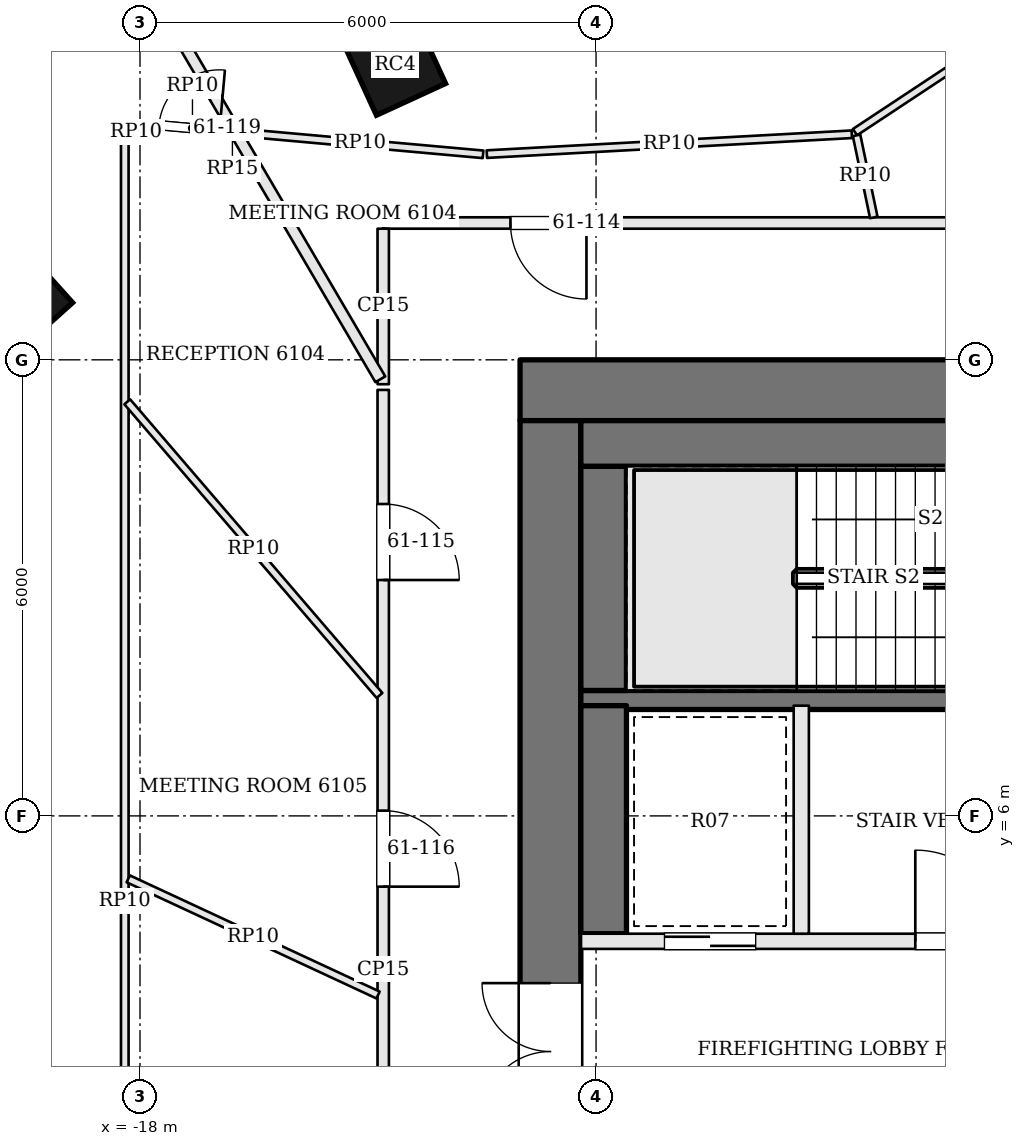
"""IFC4 building model, lengths in metres.
Left out: names, types, materials, properties, quantities, classifications, styles, units other than length and angle.
Written with IfcOpenShell. Run it as: python <this file> out.ifc"""

import sys

from ifc_helpers import new_model, si_unit, direction, frame, frame_2d, origin, origin_2d, place, context, subcontext, project, spatial, rectangle, extrude, element, fill, save


model = new_model("IFC4")
c1 = context("Model", 3, precision=1e-05, world=origin(), true_north=direction((0.0, 1.0)))
c2 = subcontext(c1, "Body", "Model", "MODEL_VIEW")
j1 = project(units=[si_unit("LENGTHUNIT", "METRE"), si_unit("PLANEANGLEUNIT", "RADIAN")], contexts=[c1])
p1 = place(None, origin())
s1 = spatial("IfcSite", under=j1, at=p1, CompositionType="ELEMENT")
p2 = place(p1, origin())
s2 = spatial("IfcBuilding", under=s1, at=p2, CompositionType="ELEMENT")
p3 = place(p2, frame((0.0, 0.0, 248.7)))
s3 = spatial("IfcBuildingStorey", under=s2, at=p3, CompositionType="ELEMENT", Elevation=248.7)
p4 = place(p3, frame((-13.0, 11.6, 0.0), z_axis=(0.0, 0.0, 1.0), x_axis=(1.0, 0.0, 0.0)))
e1 = element("IfcWall", 1, at=p4, inside=s3, PredefinedType="SHEAR", context=c2, shape_type="SweptSolid", body=[
    extrude(rectangle(XDim=26.0, YDim=0.8, at=frame_2d((13.0, 0.0))), origin(), (0.0, 0.0, 1.0), 3.9),
])
p5 = place(p4, frame((8.825, 0.0, 0.0)))
e2 = element("IfcOpeningElement", 2, at=p5, cuts=e1, PredefinedType="OPENING", context=c2, shape_type="SweptSolid", body=[
    extrude(rectangle(XDim=1.0, YDim=2.1, at=frame_2d((0.5, 1.05))), frame((0.0, 0.41, 0.0), z_axis=(0.0, -1.0, 0.0), x_axis=(1.0, 0.0, 0.0)), (0.0, 0.0, 1.0), 0.82),
])
p6 = place(p4, frame((11.825, 0.0, 0.0)))
e3 = element("IfcOpeningElement", 3, at=p6, cuts=e1, PredefinedType="OPENING", context=c2, shape_type="SweptSolid", body=[
    extrude(rectangle(XDim=0.7, YDim=2.1, at=frame_2d((0.35, 1.05))), frame((0.0, 0.41, 0.0), z_axis=(0.0, -1.0, 0.0), x_axis=(1.0, 0.0, 0.0)), (0.0, 0.0, 1.0), 0.82),
])
p7 = place(p4, frame((14.275, 0.0, 0.0)))
e4 = element("IfcOpeningElement", 4, at=p7, cuts=e1, PredefinedType="OPENING", context=c2, shape_type="SweptSolid", body=[
    extrude(rectangle(XDim=0.7, YDim=2.1, at=frame_2d((0.35, 1.05))), frame((0.0, 0.41, 0.0), z_axis=(0.0, -1.0, 0.0), x_axis=(1.0, 0.0, 0.0)), (0.0, 0.0, 1.0), 0.82),
])
p8 = place(p4, frame((16.175, 0.0, 0.0)))
e5 = element("IfcOpeningElement", 5, at=p8, cuts=e1, PredefinedType="OPENING", context=c2, shape_type="SweptSolid", body=[
    extrude(rectangle(XDim=1.0, YDim=2.1, at=frame_2d((0.5, 1.05))), frame((0.0, 0.41, 0.0), z_axis=(0.0, -1.0, 0.0), x_axis=(1.0, 0.0, 0.0)), (0.0, 0.0, 1.0), 0.82),
])
p9 = place(p3, frame((-12.6, -2.2, 0.0), z_axis=(0.0, 0.0, 1.0), x_axis=(0.0, 1.0, 0.0)))
e6 = element("IfcWall", 6, at=p9, inside=s3, PredefinedType="SHEAR", context=c2, shape_type="SweptSolid", body=[
    extrude(rectangle(XDim=13.4, YDim=0.8, at=frame_2d((6.7, 0.0))), origin(), (0.0, 0.0, 1.0), 3.9),
])
p10 = place(p9, frame((4.2, 0.0, 0.0)))
e7 = element("IfcOpeningElement", 7, at=p10, cuts=e6, PredefinedType="OPENING", context=c2, shape_type="SweptSolid", body=[
    extrude(rectangle(XDim=1.8, YDim=2.1, at=frame_2d((0.9, 1.05))), frame((0.0, 0.41, 0.0), z_axis=(0.0, -1.0, 0.0), x_axis=(1.0, 0.0, 0.0)), (0.0, 0.0, 1.0), 0.82),
])
for number, where, z_axis, x_axis in (
    (8, (-14.643, 15.881, 0.0), (0.0, 0.0, 1.0), (-0.909, -0.417, 0.0)),
    (9, (-19.593, 12.79, 0.0), (0.0, 0.0, 1.0), (-0.744, -0.668, 0.0)),
):
    element("IfcColumn", number, at=place(p3, frame(where, z_axis=z_axis, x_axis=x_axis)), inside=s3, PredefinedType="COLUMN", context=c2, shape_type="SweptSolid", body=[
        extrude(rectangle(XDim=1.0, YDim=1.0, at=origin_2d()), origin(), (0.0, 0.0, 1.0), 3.9),
    ])
p11 = place(p3, frame((-18.726, 18.663, 0.0), z_axis=(0.0, 0.0, 1.0), x_axis=(-0.83333921474, -0.552761931736, 0.0)))
e10 = element("IfcWall", 10, at=p11, inside=s3, PredefinedType="SOLIDWALL", context=c2, shape_type="SweptSolid", body=[
    extrude(rectangle(XDim=4.451, YDim=0.45, at=frame_2d((2.225, 0.0))), origin(), (0.0, 0.0, 1.0), 3.7),
])
p12 = place(p11, frame((1.175, 0.0, 0.9)))
e11 = element("IfcOpeningElement", 11, at=p12, cuts=e10, PredefinedType="OPENING", context=c2, shape_type="SweptSolid", body=[
    extrude(rectangle(XDim=2.1, YDim=2.3, at=frame_2d((1.05, 1.15))), frame((0.0, 0.235, 0.0), z_axis=(0.0, -1.0, 0.0), x_axis=(1.0, 0.0, 0.0)), (0.0, 0.0, 1.0), 0.47),
])
p13 = place(p3, frame((-12.2, 4.35, 0.0), z_axis=(0.0, 0.0, 1.0), x_axis=(1.0, 0.0, 0.0)))
e12 = element("IfcWall", 12, at=p13, inside=s3, PredefinedType="SOLIDWALL", context=c2, shape_type="SweptSolid", body=[
    extrude(rectangle(XDim=7.1, YDim=0.2, at=frame_2d((3.55, 0.0))), origin(), (0.0, 0.0, 1.0), 3.7),
])
p14 = place(p13, frame((4.4, 0.0, 0.0)))
e13 = element("IfcOpeningElement", 13, at=p14, cuts=e12, PredefinedType="OPENING", context=c2, shape_type="SweptSolid", body=[
    extrude(rectangle(XDim=1.2, YDim=2.1, at=frame_2d((0.6, 1.05))), frame((0.0, 0.11, 0.0), z_axis=(0.0, -1.0, 0.0), x_axis=(1.0, 0.0, 0.0)), (0.0, 0.0, 1.0), 0.22),
])
p15 = place(p13, frame((1.1, 0.0, 0.0)))
e14 = element("IfcOpeningElement", 14, at=p15, cuts=e12, PredefinedType="OPENING", context=c2, shape_type="SweptSolid", body=[
    extrude(rectangle(XDim=1.2, YDim=2.1, at=frame_2d((0.6, 1.05))), frame((0.0, 0.11, 0.0), z_axis=(0.0, -1.0, 0.0), x_axis=(1.0, 0.0, 0.0)), (0.0, 0.0, 1.0), 0.22),
])
p16 = place(p3, frame((-12.2, 7.525, 0.0), z_axis=(0.0, 0.0, 1.0), x_axis=(1.0, 0.0, 0.0)))
e15 = element("IfcWall", 15, at=p16, inside=s3, PredefinedType="SOLIDWALL", context=c2, shape_type="SweptSolid", body=[
    extrude(rectangle(XDim=7.1, YDim=0.25, at=frame_2d((3.55, 0.0))), origin(), (0.0, 0.0, 1.0), 3.7),
])
p17 = place(p16, frame((5.8, 0.0, 0.0)))
e16 = element("IfcOpeningElement", 16, at=p17, cuts=e15, PredefinedType="OPENING", context=c2, shape_type="SweptSolid", body=[
    extrude(rectangle(XDim=1.2, YDim=2.1, at=frame_2d((0.6, 1.05))), frame((0.0, 0.135, 0.0), z_axis=(0.0, -1.0, 0.0), x_axis=(1.0, 0.0, 0.0)), (0.0, 0.0, 1.0), 0.27),
])
p18 = place(p3, frame((-9.3, 4.45, 0.0), z_axis=(0.0, 0.0, 1.0), x_axis=(0.0, 1.0, 0.0)))
e17 = element("IfcWall", 17, at=p18, inside=s3, PredefinedType="SOLIDWALL", context=c2, shape_type="SweptSolid", body=[
    extrude(rectangle(XDim=3.0, YDim=0.2, at=frame_2d((1.5, 0.0))), origin(), (0.0, 0.0, 1.0), 3.7),
])
p19 = place(p3, frame((-11.9, 4.45, 0.0), z_axis=(0.0, 0.0, 1.0), x_axis=(0.0, 1.0, 0.0)))
e18 = element("IfcWall", 18, at=p19, inside=s3, PredefinedType="SOLIDWALL", context=c2, shape_type="SweptSolid", body=[
    extrude(rectangle(XDim=3.0, YDim=0.6, at=frame_2d((1.5, 0.0))), origin(), (0.0, 0.0, 1.0), 3.7),
])
p20 = place(p3, frame((-11.9, 7.65, 0.0), z_axis=(0.0, 0.0, 1.0), x_axis=(0.0, 1.0, 0.0)))
e19 = element("IfcWall", 19, at=p20, inside=s3, PredefinedType="SOLIDWALL", context=c2, shape_type="SweptSolid", body=[
    extrude(rectangle(XDim=2.95, YDim=0.6, at=frame_2d((1.475, 0.0))), origin(), (0.0, 0.0, 1.0), 3.7),
])
p21 = place(p3, frame((-12.2, 10.9, 0.0), z_axis=(0.0, 0.0, 1.0), x_axis=(1.0, 0.0, 0.0)))
e20 = element("IfcWall", 20, at=p21, inside=s3, PredefinedType="SOLIDWALL", context=c2, shape_type="SweptSolid", body=[
    extrude(rectangle(XDim=7.1, YDim=0.6, at=frame_2d((3.55, 0.0))), origin(), (0.0, 0.0, 1.0), 3.7),
])
p22 = place(p3, frame((5.458, 13.8, 0.0), z_axis=(0.0, 0.0, 1.0), x_axis=(-1.0, 0.0, 0.0)))
e21 = element("IfcWall", 21, at=p22, inside=s3, PredefinedType="PARTITIONING", context=c2, shape_type="SweptSolid", body=[
    extrude(rectangle(XDim=20.258, YDim=0.15, at=frame_2d((10.129, 0.0))), origin(), (0.0, 0.0, 1.0), 3.084),
])
p23 = place(p22, frame((5.957, 0.0, 0.0)))
e22 = element("IfcOpeningElement", 22, at=p23, cuts=e21, PredefinedType="OPENING", context=c2, shape_type="SweptSolid", body=[
    extrude(rectangle(XDim=1.8, YDim=2.1, at=frame_2d((0.9, 1.05))), frame((0.0, 0.085, 0.0), z_axis=(0.0, -1.0, 0.0), x_axis=(1.0, 0.0, 0.0)), (0.0, 0.0, 1.0), 0.17),
])
p24 = place(p22, frame((17.584, 0.0, 0.0)))
e23 = element("IfcOpeningElement", 23, at=p24, cuts=e21, PredefinedType="OPENING", context=c2, shape_type="SweptSolid", body=[
    extrude(rectangle(XDim=1.0, YDim=2.4, at=frame_2d((0.5, 1.2))), frame((0.0, 0.085, 0.0), z_axis=(0.0, -1.0, 0.0), x_axis=(1.0, 0.0, 0.0)), (0.0, 0.0, 1.0), 0.17),
])
p25 = place(p3, frame((-14.8, 13.725, 0.0), z_axis=(0.0, 0.0, 1.0), x_axis=(0.0, -1.0, 0.0)))
e24 = element("IfcWall", 24, at=p25, inside=s3, PredefinedType="PARTITIONING", context=c2, shape_type="SweptSolid", body=[
    extrude(rectangle(XDim=2.046, YDim=0.15, at=frame_2d((1.023, 0.0))), origin(), (0.0, 0.0, 1.0), 3.084),
])
p26 = place(p3, frame((-18.73, 18.384, 0.0), z_axis=(0.0, 0.0, 1.0), x_axis=(0.505731710935, -0.862690811679, 0.0)))
e25 = element("IfcWall", 25, at=p26, inside=s3, PredefinedType="PARTITIONING", context=c2, shape_type="SweptSolid", body=[
    extrude(rectangle(XDim=7.697, YDim=0.15, at=frame_2d((3.848, 0.0))), origin(), (0.0, 0.0, 1.0), 3.084),
])
p27 = place(p3, frame((-14.8, 11.604, 0.0), z_axis=(0.0, 0.0, 1.0), x_axis=(0.0, -1.0, 0.0)))
e26 = element("IfcWall", 26, at=p27, inside=s3, PredefinedType="PARTITIONING", context=c2, shape_type="SweptSolid", body=[
    extrude(rectangle(XDim=15.25, YDim=0.15, at=frame_2d((7.625, 0.0))), origin(), (0.0, 0.0, 1.0), 3.084),
])
p28 = place(p27, frame((1.501, 0.0, 0.0)))
e27 = element("IfcOpeningElement", 27, at=p28, cuts=e26, PredefinedType="OPENING", context=c2, shape_type="SweptSolid", body=[
    extrude(rectangle(XDim=1.0, YDim=2.1, at=frame_2d((0.5, 1.05))), frame((0.0, 0.085, 0.0), z_axis=(0.0, -1.0, 0.0), x_axis=(1.0, 0.0, 0.0)), (0.0, 0.0, 1.0), 0.17),
])
p29 = place(p27, frame((5.535, 0.0, 0.0)))
e28 = element("IfcOpeningElement", 28, at=p29, cuts=e26, PredefinedType="OPENING", context=c2, shape_type="SweptSolid", body=[
    extrude(rectangle(XDim=1.0, YDim=2.4, at=frame_2d((0.5, 1.2))), frame((0.0, 0.085, 0.0), z_axis=(0.0, -1.0, 0.0), x_axis=(1.0, 0.0, 0.0)), (0.0, 0.0, 1.0), 0.17),
])
p30 = place(p27, frame((9.35, 0.0, 0.0)))
e29 = element("IfcOpeningElement", 29, at=p30, cuts=e26, PredefinedType="OPENING", context=c2, shape_type="SweptSolid", body=[
    extrude(rectangle(XDim=1.0, YDim=2.1, at=frame_2d((0.5, 1.05))), frame((0.0, 0.085, 0.0), z_axis=(0.0, -1.0, 0.0), x_axis=(1.0, 0.0, 0.0)), (0.0, 0.0, 1.0), 0.17),
])
p31 = place(p27, frame((12.85, 0.0, 0.0)))
e30 = element("IfcOpeningElement", 30, at=p31, cuts=e26, PredefinedType="OPENING", context=c2, shape_type="SweptSolid", body=[
    extrude(rectangle(XDim=1.0, YDim=2.1, at=frame_2d((0.5, 1.05))), frame((0.0, 0.085, 0.0), z_axis=(0.0, -1.0, 0.0), x_axis=(1.0, 0.0, 0.0)), (0.0, 0.0, 1.0), 0.17),
])
p32 = place(p3, frame((-16.72, 14.994, 0.0), z_axis=(0.0, 0.0, 1.0), x_axis=(0.9959948888, -0.089410186696, 0.0)))
e31 = element("IfcWall", 31, at=p32, inside=s3, PredefinedType="PARTITIONING", context=c2, shape_type="SweptSolid", body=[
    extrude(rectangle(XDim=3.247, YDim=0.1, at=frame_2d((1.623, 0.0))), origin(), (0.0, 0.0, 1.0), 3.084),
])
p33 = place(p3, frame((-13.437, 14.706, 0.0), z_axis=(0.0, 0.0, 1.0), x_axis=(0.998525882111, 0.054277645072, 0.0)))
e32 = element("IfcWall", 32, at=p33, inside=s3, PredefinedType="PARTITIONING", context=c2, shape_type="SweptSolid", body=[
    extrude(rectangle(XDim=4.808, YDim=0.1, at=frame_2d((2.404, 0.0))), origin(), (0.0, 0.0, 1.0), 3.084),
])
p34 = place(p3, frame((-8.594, 14.995, 0.0), z_axis=(0.0, 0.0, 1.0), x_axis=(0.834065304192, 0.551665721559, 0.0)))
e33 = element("IfcWall", 33, at=p34, inside=s3, PredefinedType="PARTITIONING", context=c2, shape_type="SweptSolid", body=[
    extrude(rectangle(XDim=3.997, YDim=0.1, at=frame_2d((1.998, 0.0))), origin(), (0.0, 0.0, 1.0), 3.084),
])
p35 = place(p3, frame((-8.346, 13.873, 0.0), z_axis=(0.0, 0.0, 1.0), x_axis=(-0.205341331552, 0.978690419671, 0.0)))
e34 = element("IfcWall", 34, at=p35, inside=s3, PredefinedType="PARTITIONING", context=c2, shape_type="SweptSolid", body=[
    extrude(rectangle(XDim=1.103, YDim=0.1, at=frame_2d((0.552, 0.0))), origin(), (0.0, 0.0, 1.0), 3.084),
])
p36 = place(p3, frame((-18.2, 14.901, 0.0), z_axis=(0.0, 0.0, 1.0), x_axis=(0.833509335289, 0.552505373717, 0.0)))
e35 = element("IfcWall", 35, at=p36, inside=s3, PredefinedType="PARTITIONING", context=c2, shape_type="SweptSolid", body=[
    extrude(rectangle(XDim=0.36, YDim=0.1, at=frame_2d((0.18, 0.0))), origin(), (0.0, 0.0, 1.0), 3.084),
])
p37 = place(p3, frame((-17.85, 15.096, 0.0), z_axis=(0.0, 0.0, 1.0), x_axis=(0.995966605389, -0.089724695315, 0.0)))
e36 = element("IfcWall", 36, at=p37, inside=s3, PredefinedType="PARTITIONING", context=c2, shape_type="SweptSolid", body=[
    extrude(rectangle(XDim=1.086, YDim=0.1, at=frame_2d((0.543, 0.0))), origin(), (0.0, 0.0, 1.0), 3.084),
])
p38 = place(p37, frame((0.1, 0.0, 0.0)))
e37 = element("IfcOpeningElement", 37, at=p38, cuts=e36, PredefinedType="OPENING", context=c2, shape_type="SweptSolid", body=[
    extrude(rectangle(XDim=0.8, YDim=2.1, at=frame_2d((0.4, 1.05))), frame((0.0, 0.06, 0.0), z_axis=(0.0, -1.0, 0.0), x_axis=(1.0, 0.0, 0.0)), (0.0, 0.0, 1.0), 0.12),
])
p39 = place(p3, frame((-18.2, -5.081, 0.0), z_axis=(0.0, 0.0, 1.0), x_axis=(0.0, 1.0, 0.0)))
e38 = element("IfcWall", 38, at=p39, inside=s3, PredefinedType="PARTITIONING", context=c2, shape_type="SweptSolid", body=[
    extrude(rectangle(XDim=19.932, YDim=0.1, at=frame_2d((9.966, 0.0))), origin(), (0.0, 0.0, 1.0), 3.084),
])
p40 = place(p39, frame((6.707, 0.0, 0.0)))
e39 = element("IfcOpeningElement", 39, at=p40, cuts=e38, PredefinedType="OPENING", context=c2, shape_type="SweptSolid", body=[
    extrude(rectangle(XDim=0.9, YDim=2.1, at=frame_2d((0.45, 1.05))), frame((0.0, 0.06, 0.0), z_axis=(0.0, -1.0, 0.0), x_axis=(1.0, 0.0, 0.0)), (0.0, 0.0, 1.0), 0.12),
])
p41 = place(p39, frame((1.863, 0.0, 0.0)))
e40 = element("IfcOpeningElement", 40, at=p41, cuts=e38, PredefinedType="OPENING", context=c2, shape_type="SweptSolid", body=[
    extrude(rectangle(XDim=0.9, YDim=2.1, at=frame_2d((0.45, 1.05))), frame((0.0, 0.06, 0.0), z_axis=(0.0, -1.0, 0.0), x_axis=(1.0, 0.0, 0.0)), (0.0, 0.0, 1.0), 0.12),
])
p42 = place(p3, frame((-14.849, 7.584, 0.0), z_axis=(0.0, 0.0, 1.0), x_axis=(-0.65160818205, 0.758555717852, 0.0)))
e41 = element("IfcWall", 41, at=p42, inside=s3, PredefinedType="PARTITIONING", context=c2, shape_type="SweptSolid", body=[
    extrude(rectangle(XDim=5.093, YDim=0.1, at=frame_2d((2.546, 0.0))), origin(), (0.0, 0.0, 1.0), 3.084),
])
p43 = place(p3, frame((-14.868, 3.644, 0.0), z_axis=(0.0, 0.0, 1.0), x_axis=(-0.906769022566, 0.421627726455, 0.0)))
e42 = element("IfcWall", 42, at=p43, inside=s3, PredefinedType="PARTITIONING", context=c2, shape_type="SweptSolid", body=[
    extrude(rectangle(XDim=3.625, YDim=0.1, at=frame_2d((1.812, 0.0))), origin(), (0.0, 0.0, 1.0), 3.084),
])
p44 = place(p10, origin())
e43 = element("IfcDoor", 43, at=p44, inside=s3, OperationType="DOUBLE_DOOR_SINGLE_SWING", PredefinedType="DOOR", context=c2, shape_type="SweptSolid", body=[
    extrude(rectangle(XDim=1.8, YDim=2.1, at=frame_2d((0.9, 1.05))), frame((0.0, 0.025, 0.0), z_axis=(0.0, -1.0, 0.0), x_axis=(1.0, 0.0, 0.0)), (0.0, 0.0, 1.0), 0.05),
])
fill(e7, e43)
p45 = place(p14, origin())
e44 = element("IfcDoor", 44, at=p45, inside=s3, OperationType="SINGLE_SWING_LEFT", PredefinedType="DOOR", context=c2, shape_type="SweptSolid", body=[
    extrude(rectangle(XDim=1.2, YDim=2.1, at=frame_2d((0.6, 1.05))), frame((0.0, 0.025, 0.0), z_axis=(0.0, -1.0, 0.0), x_axis=(1.0, 0.0, 0.0)), (0.0, 0.0, 1.0), 0.05),
])
fill(e13, e44)
p46 = place(p15, origin())
e45 = element("IfcDoor", 45, at=p46, inside=s3, OperationType="SLIDING_TO_RIGHT", PredefinedType="DOOR", context=c2, shape_type="SweptSolid", body=[
    extrude(rectangle(XDim=1.2, YDim=2.1, at=frame_2d((0.6, 1.05))), frame((0.0, 0.025, 0.0), z_axis=(0.0, -1.0, 0.0), x_axis=(1.0, 0.0, 0.0)), (0.0, 0.0, 1.0), 0.05),
])
fill(e14, e45)
p47 = place(p24, origin())
e46 = element("IfcDoor", 46, at=p47, inside=s3, OperationType="SINGLE_SWING_LEFT", PredefinedType="DOOR", context=c2, shape_type="SweptSolid", body=[
    extrude(rectangle(XDim=1.0, YDim=2.4, at=frame_2d((0.5, 1.2))), frame((0.0, 0.025, 0.0), z_axis=(0.0, -1.0, 0.0), x_axis=(1.0, 0.0, 0.0)), (0.0, 0.0, 1.0), 0.05),
])
fill(e23, e46)
p48 = place(p28, origin())
e47 = element("IfcDoor", 47, at=p48, inside=s3, OperationType="SINGLE_SWING_RIGHT", PredefinedType="DOOR", context=c2, shape_type="SweptSolid", body=[
    extrude(rectangle(XDim=1.0, YDim=2.1, at=frame_2d((0.5, 1.05))), frame((0.0, 0.025, 0.0), z_axis=(0.0, -1.0, 0.0), x_axis=(1.0, 0.0, 0.0)), (0.0, 0.0, 1.0), 0.05),
])
fill(e27, e47)
p49 = place(p29, origin())
e48 = element("IfcDoor", 48, at=p49, inside=s3, OperationType="SINGLE_SWING_RIGHT", PredefinedType="DOOR", context=c2, shape_type="SweptSolid", body=[
    extrude(rectangle(XDim=1.0, YDim=2.4, at=frame_2d((0.5, 1.2))), frame((0.0, 0.025, 0.0), z_axis=(0.0, -1.0, 0.0), x_axis=(1.0, 0.0, 0.0)), (0.0, 0.0, 1.0), 0.05),
])
fill(e28, e48)
p50 = place(p38, origin())
e49 = element("IfcDoor", 49, at=p50, inside=s3, OperationType="SINGLE_SWING_RIGHT", PredefinedType="DOOR", context=c2, shape_type="SweptSolid", body=[
    extrude(rectangle(XDim=0.8, YDim=2.1, at=frame_2d((0.4, 1.05))), frame((0.0, 0.025, 0.0), z_axis=(0.0, -1.0, 0.0), x_axis=(1.0, 0.0, 0.0)), (0.0, 0.0, 1.0), 0.05),
])
fill(e37, e49)
save(model, sys.argv[1])
